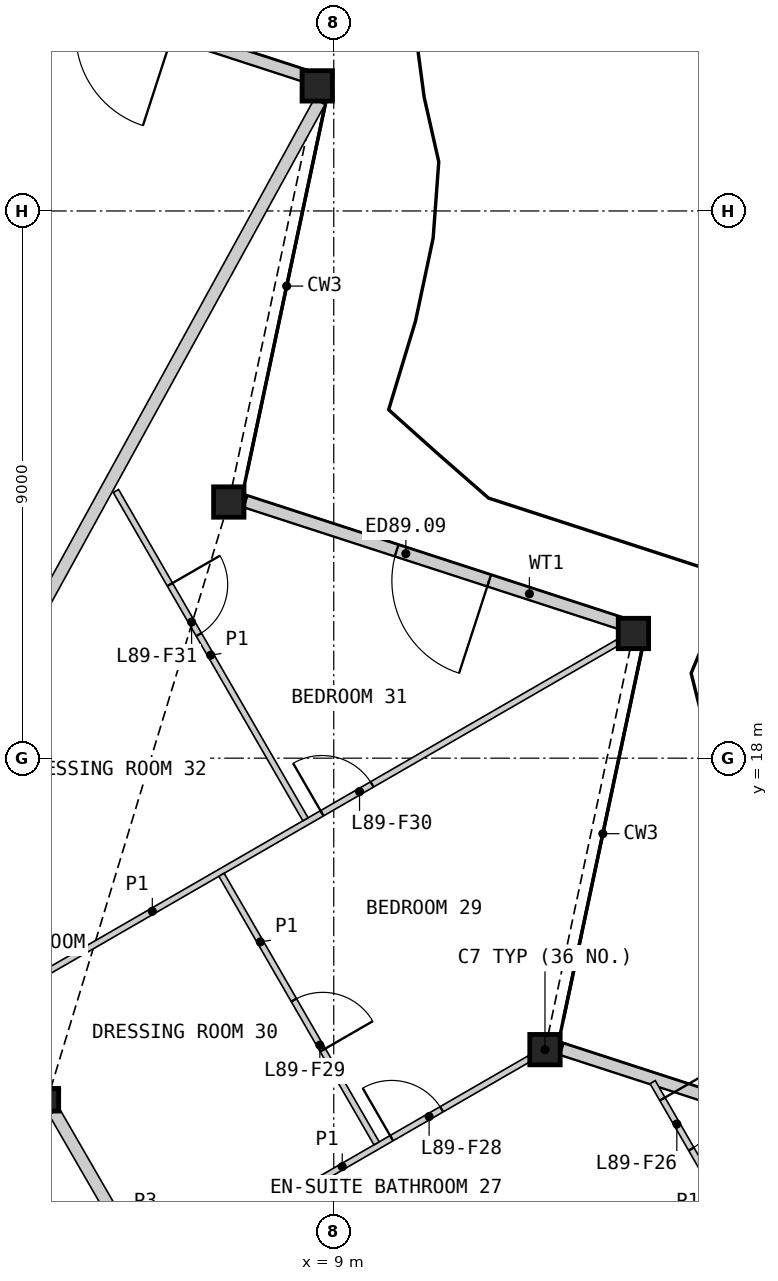
"""IFC4 building model, lengths in metres.
Left out: names, types, materials, properties, quantities, classifications, styles, units other than length and angle.
Written with IfcOpenShell. Run it as: python <this file> out.ifc"""

import sys

from ifc_helpers import new_model, si_unit, direction, frame, frame_2d, origin, origin_2d, place, context, subcontext, project, spatial, rectangle, hollow_rectangle, i_section, extrude, element, fill, save


model = new_model("IFC4")
c1 = context("Model", 3, precision=1e-05, world=origin(), true_north=direction((0.0, 1.0)))
c2 = subcontext(c1, "Body", "Model", "MODEL_VIEW")
j1 = project(units=[si_unit("LENGTHUNIT", "METRE"), si_unit("PLANEANGLEUNIT", "RADIAN")], contexts=[c1])
p1 = place(None, origin())
s1 = spatial("IfcSite", under=j1, at=p1, CompositionType="ELEMENT")
p2 = place(p1, origin())
s2 = spatial("IfcBuilding", under=s1, at=p2, CompositionType="ELEMENT")
p3 = place(p2, frame((0.0, 0.0, 391.6)))
s3 = spatial("IfcBuildingStorey", under=s2, at=p3, CompositionType="ELEMENT", Elevation=391.6)
for number, where, z_axis, x_axis in (
    (1, (12.474, 13.206, 0.0), (0.0, 0.0, 1.0), (1.0, 0.0, 0.0)),
    (2, (13.929, 20.051, 0.0), (0.0, 0.0, 1.0), (1.0, 0.0, 0.0)),
    (3, (7.274, 22.213, 0.0), (0.0, 0.0, 1.0), (1.0, 0.0, 0.0)),
    (4, (8.729, 29.057, 0.0), (0.0, 0.0, 1.0), (1.0, 0.0, 0.0)),
):
    element("IfcColumn", number, at=place(p3, frame(where, z_axis=z_axis, x_axis=x_axis)), inside=s3, PredefinedType="COLUMN", context=c2, shape_type="SweptSolid", body=[
        extrude(hollow_rectangle(XDim=0.5, YDim=0.5, WallThickness=0.03, at=origin_2d()), origin(), (0.0, 0.0, 1.0), 3.4),
    ])
p4 = place(p3, frame((4.289, 12.382, 0.0), z_axis=(0.0, 0.0, 1.0), x_axis=(1.0, 0.0, 0.0)))
e5 = element("IfcColumn", 5, at=p4, inside=s3, PredefinedType="COLUMN", context=c2, shape_type="SweptSolid", body=[
    extrude(i_section(OverallWidth=0.374, OverallDepth=0.372, WebThickness=0.016, FlangeThickness=0.026, at=origin_2d()), origin(), (0.0, 0.0, 1.0), 3.4),
])
p5 = place(p3, frame((18.974, 11.191, 0.0), z_axis=(0.0, 0.0, 1.0), x_axis=(-0.951057912068, 0.309012698595, 0.0)))
e6 = element("IfcWall", 6, at=p5, inside=s3, PredefinedType="SOLIDWALL", context=c2, shape_type="SweptSolid", body=[
    extrude(rectangle(XDim=6.546, YDim=0.2, at=frame_2d((3.273, 0.0))), origin(), (0.0, 0.0, 1.0), 2.634),
])
p6 = place(p5, frame((2.333, 0.0, 0.0)))
e7 = element("IfcOpeningElement", 7, at=p6, cuts=e6, PredefinedType="OPENING", context=c2, shape_type="SweptSolid", body=[
    extrude(rectangle(XDim=1.6, YDim=2.25, at=frame_2d((0.8, 1.125))), frame((0.0, 0.11, 0.0), z_axis=(0.0, -1.0, 0.0), x_axis=(1.0, 0.0, 0.0)), (0.0, 0.0, 1.0), 0.22),
])
p7 = place(p3, frame((13.774, 20.198, 0.0), z_axis=(0.0, 0.0, 1.0), x_axis=(-0.951046950169, 0.309046434335, 0.0)))
e8 = element("IfcWall", 8, at=p7, inside=s3, PredefinedType="SOLIDWALL", context=c2, shape_type="SweptSolid", body=[
    extrude(rectangle(XDim=6.546, YDim=0.2, at=frame_2d((3.273, 0.0))), origin(), (0.0, 0.0, 1.0), 2.634),
])
p8 = place(p7, frame((2.333, 0.0, 0.0)))
e9 = element("IfcOpeningElement", 9, at=p8, cuts=e8, PredefinedType="OPENING", context=c2, shape_type="SweptSolid", body=[
    extrude(rectangle(XDim=1.6, YDim=2.25, at=frame_2d((0.8, 1.125))), frame((0.0, 0.11, 0.0), z_axis=(0.0, -1.0, 0.0), x_axis=(1.0, 0.0, 0.0)), (0.0, 0.0, 1.0), 0.22),
])
p9 = place(p3, frame((8.574, 29.205, 0.0), z_axis=(0.0, 0.0, 1.0), x_axis=(-0.951057912068, 0.309012698595, 0.0)))
e10 = element("IfcWall", 10, at=p9, inside=s3, PredefinedType="SOLIDWALL", context=c2, shape_type="SweptSolid", body=[
    extrude(rectangle(XDim=6.546, YDim=0.2, at=frame_2d((3.273, 0.0))), origin(), (0.0, 0.0, 1.0), 2.634),
])
p10 = place(p9, frame((2.333, 0.0, 0.0)))
e11 = element("IfcOpeningElement", 11, at=p10, cuts=e10, PredefinedType="OPENING", context=c2, shape_type="SweptSolid", body=[
    extrude(rectangle(XDim=1.6, YDim=2.25, at=frame_2d((0.8, 1.125))), frame((0.0, 0.11, 0.0), z_axis=(0.0, -1.0, 0.0), x_axis=(1.0, 0.0, 0.0)), (0.0, 0.0, 1.0), 0.22),
])
p11 = place(p3, frame((4.403, 12.185, 0.0), z_axis=(0.0, 0.0, 1.0), x_axis=(0.499992155518, -0.866029932751, 0.0)))
e12 = element("IfcWall", 12, at=p11, inside=s3, PredefinedType="PARTITIONING", context=c2, shape_type="SweptSolid", body=[
    extrude(rectangle(XDim=8.123, YDim=0.2, at=frame_2d((4.062, 0.0))), origin(), (0.0, 0.0, 1.0), 3.1),
])
p12 = place(p11, frame((3.762, 0.0, 0.0)))
e13 = element("IfcOpeningElement", 13, at=p12, cuts=e12, PredefinedType="OPENING", context=c2, shape_type="SweptSolid", body=[
    extrude(rectangle(XDim=1.0, YDim=2.1, at=frame_2d((0.5, 1.05))), frame((0.0, 0.11, 0.0), z_axis=(0.0, -1.0, 0.0), x_axis=(1.0, 0.0, 0.0)), (0.0, 0.0, 1.0), 0.22),
])
p13 = place(p3, frame((13.385, 7.728, 0.0), z_axis=(0.0, 0.0, 1.0), x_axis=(0.866023139795, 0.500003921324, 0.0)))
e14 = element("IfcWall", 14, at=p13, inside=s3, PredefinedType="PARTITIONING", context=c2, shape_type="SweptSolid", body=[
    extrude(rectangle(XDim=6.332, YDim=0.25, at=frame_2d((3.166, 0.0))), origin(), (0.0, 0.0, 1.0), 2.33),
])
p14 = place(p3, frame((2.011, 16.499, 0.0), z_axis=(0.0, 0.0, 1.0), x_axis=(0.481548701843, 0.876419333284, 0.0)))
e15 = element("IfcWall", 15, at=p14, inside=s3, PredefinedType="PARTITIONING", context=c2, shape_type="SweptSolid", body=[
    extrude(rectangle(XDim=14.032, YDim=0.2, at=frame_2d((7.016, 0.0))), origin(), (0.0, 0.0, 1.0), 2.33),
])
p15 = place(p3, frame((3.465, 14.01, 0.0), z_axis=(0.0, 0.0, 1.0), x_axis=(0.866032376801, 0.499987922186, 0.0)))
e16 = element("IfcWall", 16, at=p15, inside=s3, PredefinedType="PARTITIONING", context=c2, shape_type="SweptSolid", body=[
    extrude(rectangle(XDim=11.782, YDim=0.1, at=frame_2d((5.891, 0.0))), origin(), (0.0, 0.0, 1.0), 2.33),
])
p16 = place(p15, frame((6.168, 0.0, 0.0)))
e17 = element("IfcOpeningElement", 17, at=p16, cuts=e16, PredefinedType="OPENING", context=c2, shape_type="SweptSolid", body=[
    extrude(rectangle(XDim=0.95, YDim=2.1, at=frame_2d((0.475, 1.05))), frame((0.0, 0.06, 0.0), z_axis=(0.0, -1.0, 0.0), x_axis=(1.0, 0.0, 0.0)), (0.0, 0.0, 1.0), 0.12),
])
p17 = place(p3, frame((6.065, 9.506, 0.0), z_axis=(0.0, 0.0, 1.0), x_axis=(0.866018949465, 0.500011179042, 0.0)))
e18 = element("IfcWall", 18, at=p17, inside=s3, PredefinedType="PARTITIONING", context=c2, shape_type="SweptSolid", body=[
    extrude(rectangle(XDim=7.1, YDim=0.1, at=frame_2d((3.55, 0.0))), origin(), (0.0, 0.0, 1.0), 2.33),
])
p18 = place(p17, frame((4.488, 0.0, 0.0)))
e19 = element("IfcOpeningElement", 19, at=p18, cuts=e18, PredefinedType="OPENING", context=c2, shape_type="SweptSolid", body=[
    extrude(rectangle(XDim=0.95, YDim=2.1, at=frame_2d((0.475, 1.05))), frame((0.0, 0.06, 0.0), z_axis=(0.0, -1.0, 0.0), x_axis=(1.0, 0.0, 0.0)), (0.0, 0.0, 1.0), 0.12),
])
p19 = place(p3, frame((5.417, 22.394, 0.0), z_axis=(0.0, 0.0, 1.0), x_axis=(0.499975529996, -0.866039531087, 0.0)))
e20 = element("IfcWall", 20, at=p19, inside=s3, PredefinedType="PARTITIONING", context=c2, shape_type="SweptSolid", body=[
    extrude(rectangle(XDim=6.235, YDim=0.1, at=frame_2d((3.118, 0.0))), origin(), (0.0, 0.0, 1.0), 2.33),
])
p20 = place(p19, frame((1.777, 0.0, 0.0)))
e21 = element("IfcOpeningElement", 21, at=p20, cuts=e20, PredefinedType="OPENING", context=c2, shape_type="SweptSolid", body=[
    extrude(rectangle(XDim=0.95, YDim=2.1, at=frame_2d((0.475, 1.05))), frame((0.0, 0.06, 0.0), z_axis=(0.0, -1.0, 0.0), x_axis=(1.0, 0.0, 0.0)), (0.0, 0.0, 1.0), 0.12),
])
p21 = place(p3, frame((7.154, 16.082, 0.0), z_axis=(0.0, 0.0, 1.0), x_axis=(0.499984882974, -0.866034131428, 0.0)))
e22 = element("IfcWall", 22, at=p21, inside=s3, PredefinedType="PARTITIONING", context=c2, shape_type="SweptSolid", body=[
    extrude(rectangle(XDim=5.1, YDim=0.1, at=frame_2d((2.55, 0.0))), origin(), (0.0, 0.0, 1.0), 2.33),
])
p22 = place(p21, frame((2.379, 0.0, 0.0)))
e23 = element("IfcOpeningElement", 23, at=p22, cuts=e22, PredefinedType="OPENING", context=c2, shape_type="SweptSolid", body=[
    extrude(rectangle(XDim=0.95, YDim=2.1, at=frame_2d((0.475, 1.05))), frame((0.0, 0.06, 0.0), z_axis=(0.0, -1.0, 0.0), x_axis=(1.0, 0.0, 0.0)), (0.0, 0.0, 1.0), 0.12),
])
p23 = place(p3, frame((14.244, 12.672, 0.0), z_axis=(0.0, 0.0, 1.0), x_axis=(0.500021098671, -0.866013222118, 0.0)))
e24 = element("IfcWall", 24, at=p23, inside=s3, PredefinedType="PARTITIONING", context=c2, shape_type="SweptSolid", body=[
    extrude(rectangle(XDim=3.727, YDim=0.1, at=frame_2d((1.863, 0.0))), origin(), (0.0, 0.0, 1.0), 2.33),
])
p24 = place(p23, frame((0.321, 0.0, 0.0)))
e25 = element("IfcOpeningElement", 25, at=p24, cuts=e24, PredefinedType="OPENING", context=c2, shape_type="SweptSolid", body=[
    extrude(rectangle(XDim=0.95, YDim=2.1, at=frame_2d((0.475, 1.05))), frame((0.0, 0.06, 0.0), z_axis=(0.0, -1.0, 0.0), x_axis=(1.0, 0.0, 0.0)), (0.0, 0.0, 1.0), 0.12),
])
p25 = place(p8, origin())
e26 = element("IfcDoor", 26, at=p25, inside=s3, OperationType="DOUBLE_DOOR_SINGLE_SWING", PredefinedType="DOOR", context=c2, shape_type="SweptSolid", body=[
    extrude(rectangle(XDim=1.6, YDim=2.25, at=frame_2d((0.8, 1.125))), frame((0.0, 0.025, 0.0), z_axis=(0.0, -1.0, 0.0), x_axis=(1.0, 0.0, 0.0)), (0.0, 0.0, 1.0), 0.05),
])
fill(e9, e26)
p26 = place(p24, origin())
e27 = element("IfcDoor", 27, at=p26, inside=s3, OperationType="SINGLE_SWING_LEFT", PredefinedType="DOOR", context=c2, shape_type="SweptSolid", body=[
    extrude(rectangle(XDim=0.95, YDim=2.1, at=frame_2d((0.475, 1.05))), frame((0.0, 0.025, 0.0), z_axis=(0.0, -1.0, 0.0), x_axis=(1.0, 0.0, 0.0)), (0.0, 0.0, 1.0), 0.05),
])
fill(e25, e27)
p27 = place(p18, origin())
e28 = element("IfcDoor", 28, at=p27, inside=s3, OperationType="SINGLE_SWING_LEFT", PredefinedType="DOOR", context=c2, shape_type="SweptSolid", body=[
    extrude(rectangle(XDim=0.95, YDim=2.1, at=frame_2d((0.475, 1.05))), frame((0.0, 0.025, 0.0), z_axis=(0.0, -1.0, 0.0), x_axis=(1.0, 0.0, 0.0)), (0.0, 0.0, 1.0), 0.05),
])
fill(e19, e28)
p28 = place(p22, origin())
e29 = element("IfcDoor", 29, at=p28, inside=s3, OperationType="SINGLE_SWING_RIGHT", PredefinedType="DOOR", context=c2, shape_type="SweptSolid", body=[
    extrude(rectangle(XDim=0.95, YDim=2.1, at=frame_2d((0.475, 1.05))), frame((0.0, 0.025, 0.0), z_axis=(0.0, -1.0, 0.0), x_axis=(1.0, 0.0, 0.0)), (0.0, 0.0, 1.0), 0.05),
])
fill(e23, e29)
p29 = place(p16, origin())
e30 = element("IfcDoor", 30, at=p29, inside=s3, OperationType="SINGLE_SWING_LEFT", PredefinedType="DOOR", context=c2, shape_type="SweptSolid", body=[
    extrude(rectangle(XDim=0.95, YDim=2.1, at=frame_2d((0.475, 1.05))), frame((0.0, 0.025, 0.0), z_axis=(0.0, -1.0, 0.0), x_axis=(1.0, 0.0, 0.0)), (0.0, 0.0, 1.0), 0.05),
])
fill(e17, e30)
p30 = place(p20, origin())
e31 = element("IfcDoor", 31, at=p30, inside=s3, OperationType="SINGLE_SWING_LEFT", PredefinedType="DOOR", context=c2, shape_type="SweptSolid", body=[
    extrude(rectangle(XDim=0.95, YDim=2.1, at=frame_2d((0.475, 1.05))), frame((0.0, 0.025, 0.0), z_axis=(0.0, -1.0, 0.0), x_axis=(1.0, 0.0, 0.0)), (0.0, 0.0, 1.0), 0.05),
])
fill(e21, e31)
save(model, sys.argv[1])
